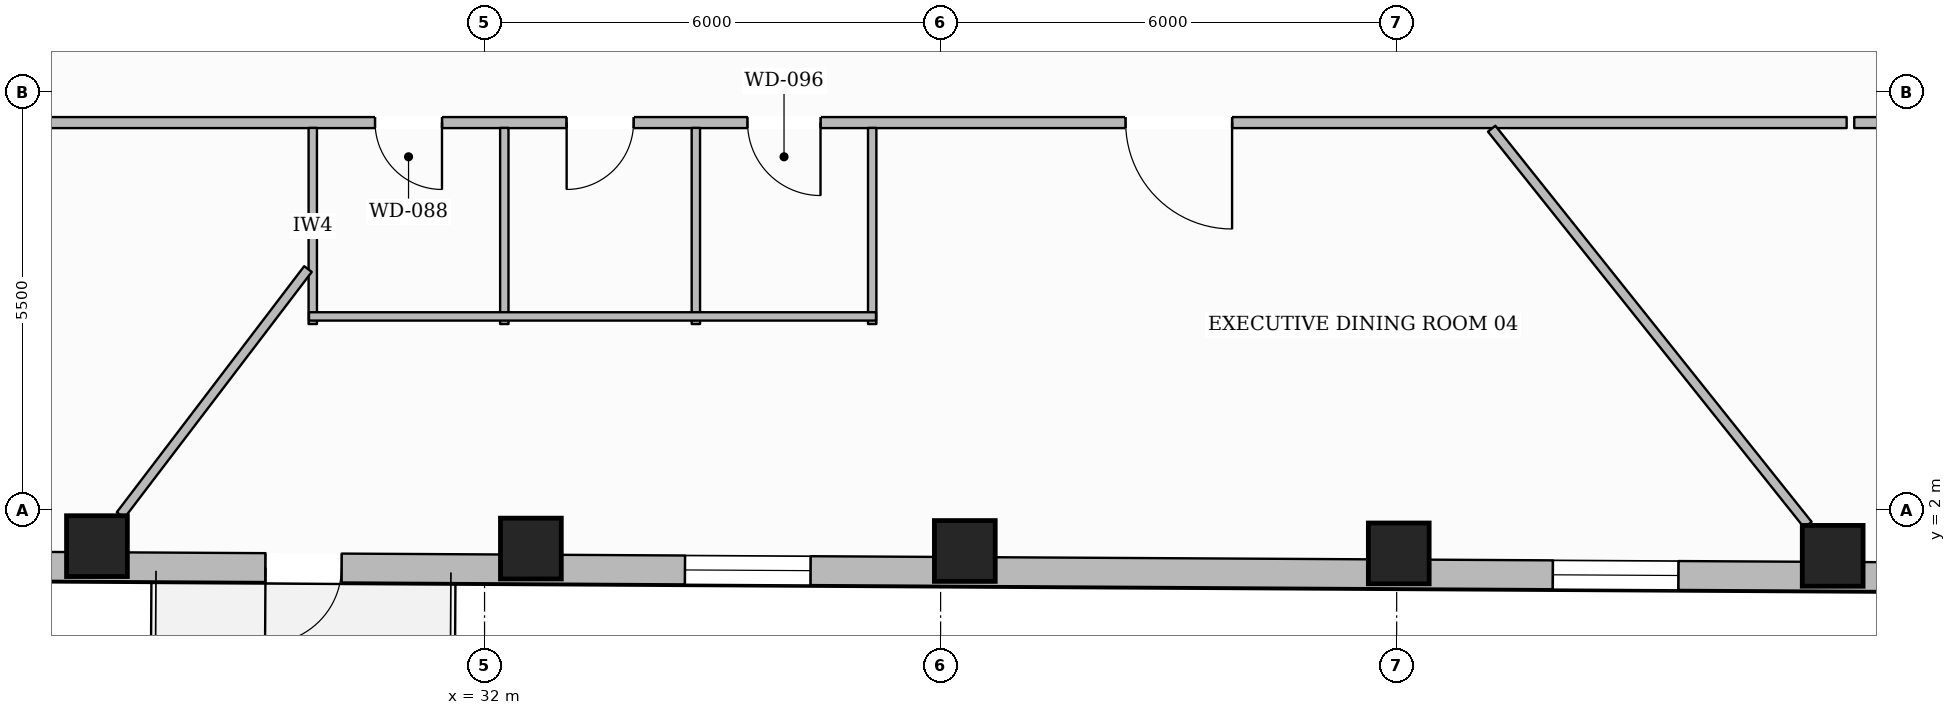
"""IFC4 building model, lengths in metres.
Left out: names, types, materials, properties, quantities, classifications, styles, units other than length and angle.
Written with IfcOpenShell. Run it as: python <this file> out.ifc"""

import sys

from ifc_helpers import new_model, si_unit, direction, frame, frame_2d, origin, origin_2d, place, context, subcontext, project, spatial, rectangle, hollow_rectangle, extrude, element, fill, save


model = new_model("IFC4")
c1 = context("Model", 3, precision=1e-05, world=origin(), true_north=direction((0.0, 1.0)))
c2 = subcontext(c1, "Body", "Model", "MODEL_VIEW")
j1 = project(units=[si_unit("LENGTHUNIT", "METRE"), si_unit("PLANEANGLEUNIT", "RADIAN")], contexts=[c1])
p1 = place(None, origin())
s1 = spatial("IfcSite", under=j1, at=p1, CompositionType="ELEMENT")
p2 = place(p1, origin())
s2 = spatial("IfcBuilding", under=s1, at=p2, CompositionType="ELEMENT")
p3 = place(p2, frame((0.0, 0.0, 48.35)))
s3 = spatial("IfcBuildingStorey", under=s2, at=p3, CompositionType="ELEMENT", Elevation=48.35)
for number, where, z_axis, x_axis in (
    (1, (26.901, 1.528, 0.0), (0.0, 0.0, 1.0), (1.0, 0.0, 0.0)),
    (2, (32.61, 1.496, 0.0), (0.0, 0.0, 1.0), (1.0, 0.0, 0.0)),
    (3, (38.319, 1.464, 0.0), (0.0, 0.0, 1.0), (1.0, 0.0, 0.0)),
    (4, (44.027, 1.432, 0.0), (0.0, 0.0, 1.0), (1.0, 0.0, 0.0)),
    (5, (49.736, 1.4, 0.0), (0.0, 0.0, 1.0), (1.0, 0.0, 0.0)),
):
    element("IfcColumn", number, at=place(p3, frame(where, z_axis=z_axis, x_axis=x_axis)), inside=s3, PredefinedType="COLUMN", context=c2, shape_type="SweptSolid", body=[
        extrude(hollow_rectangle(XDim=0.8, YDim=0.8, WallThickness=0.036, at=origin_2d()), origin(), (0.0, 0.0, 1.0), 3.59),
    ])
p4 = place(p3, frame((55.923, 1.096, 0.0), z_axis=(0.0, 0.0, 1.0), x_axis=(-0.999984419156, 0.005582243732, 0.0)))
e6 = element("IfcWall", 6, at=p4, inside=s3, PredefinedType="STANDARD", context=c2, shape_type="SweptSolid", body=[
    extrude(rectangle(XDim=35.207, YDim=0.38, at=frame_2d((17.604, 0.0))), origin(), (0.0, 0.0, 1.0), 2.97),
])
p5 = place(p4, frame((25.805, 0.0, 0.0)))
e7 = element("IfcOpeningElement", 7, at=p5, cuts=e6, PredefinedType="OPENING", context=c2, shape_type="SweptSolid", body=[
    extrude(rectangle(XDim=1.0, YDim=2.2, at=frame_2d((0.5, 1.1))), frame((0.0, 0.2, 0.0), z_axis=(0.0, -1.0, 0.0), x_axis=(1.0, 0.0, 0.0)), (0.0, 0.0, 1.0), 0.4),
])
p6 = place(p4, frame((31.054, 0.0, 0.65)))
e8 = element("IfcOpeningElement", 8, at=p6, cuts=e6, PredefinedType="OPENING", context=c2, shape_type="SweptSolid", body=[
    extrude(rectangle(XDim=1.65, YDim=1.75, at=frame_2d((0.825, 0.875))), frame((0.0, 0.2, 0.0), z_axis=(0.0, -1.0, 0.0), x_axis=(1.0, 0.0, 0.0)), (0.0, 0.0, 1.0), 0.4),
])
p7 = place(p4, frame((19.636, 0.0, 0.65)))
e9 = element("IfcOpeningElement", 9, at=p7, cuts=e6, PredefinedType="OPENING", context=c2, shape_type="SweptSolid", body=[
    extrude(rectangle(XDim=1.65, YDim=1.75, at=frame_2d((0.825, 0.875))), frame((0.0, 0.2, 0.0), z_axis=(0.0, -1.0, 0.0), x_axis=(1.0, 0.0, 0.0)), (0.0, 0.0, 1.0), 0.4),
])
p8 = place(p4, frame((8.218, 0.0, 0.65)))
e10 = element("IfcOpeningElement", 10, at=p8, cuts=e6, PredefinedType="OPENING", context=c2, shape_type="SweptSolid", body=[
    extrude(rectangle(XDim=1.65, YDim=1.75, at=frame_2d((0.825, 0.875))), frame((0.0, 0.2, 0.0), z_axis=(0.0, -1.0, 0.0), x_axis=(1.0, 0.0, 0.0)), (0.0, 0.0, 1.0), 0.4),
])
p9 = place(p4, frame((2.509, 0.0, 0.65)))
e11 = element("IfcOpeningElement", 11, at=p9, cuts=e6, PredefinedType="OPENING", context=c2, shape_type="SweptSolid", body=[
    extrude(rectangle(XDim=1.65, YDim=1.75, at=frame_2d((0.825, 0.875))), frame((0.0, 0.2, 0.0), z_axis=(0.0, -1.0, 0.0), x_axis=(1.0, 0.0, 0.0)), (0.0, 0.0, 1.0), 0.4),
])
p10 = place(p3, frame((56.681, 7.1, 0.0), z_axis=(0.0, 0.0, 1.0), x_axis=(-1.0, 0.0, 0.0)))
e12 = element("IfcWall", 12, at=p10, inside=s3, PredefinedType="PARTITIONING", context=c2, shape_type="SweptSolid", body=[
    extrude(rectangle(XDim=6.661, YDim=0.145, at=frame_2d((3.331, 0.0))), origin(), (0.0, 0.0, 1.0), 3.59),
])
p11 = place(p3, frame((49.92, 7.1, 0.0), z_axis=(0.0, 0.0, 1.0), x_axis=(-1.0, 0.0, 0.0)))
e13 = element("IfcWall", 13, at=p11, inside=s3, PredefinedType="PARTITIONING", context=c2, shape_type="SweptSolid", body=[
    extrude(rectangle(XDim=23.84, YDim=0.145, at=frame_2d((11.92, 0.0))), origin(), (0.0, 0.0, 1.0), 3.278),
])
p12 = place(p11, frame((18.48, 0.0, 0.0)))
e14 = element("IfcOpeningElement", 14, at=p12, cuts=e13, PredefinedType="OPENING", context=c2, shape_type="SweptSolid", body=[
    extrude(rectangle(XDim=0.88, YDim=2.1, at=frame_2d((0.44, 1.05))), frame((0.0, 0.083, 0.0), z_axis=(0.0, -1.0, 0.0), x_axis=(1.0, 0.0, 0.0)), (0.0, 0.0, 1.0), 0.165),
])
p13 = place(p11, frame((15.96, 0.0, 0.0)))
e15 = element("IfcOpeningElement", 15, at=p13, cuts=e13, PredefinedType="OPENING", context=c2, shape_type="SweptSolid", body=[
    extrude(rectangle(XDim=0.88, YDim=2.1, at=frame_2d((0.44, 1.05))), frame((0.0, 0.083, 0.0), z_axis=(0.0, -1.0, 0.0), x_axis=(1.0, 0.0, 0.0)), (0.0, 0.0, 1.0), 0.165),
])
p14 = place(p11, frame((13.5, 0.0, 0.0)))
e16 = element("IfcOpeningElement", 16, at=p14, cuts=e13, PredefinedType="OPENING", context=c2, shape_type="SweptSolid", body=[
    extrude(rectangle(XDim=0.96, YDim=2.1, at=frame_2d((0.48, 1.05))), frame((0.0, 0.083, 0.0), z_axis=(0.0, -1.0, 0.0), x_axis=(1.0, 0.0, 0.0)), (0.0, 0.0, 1.0), 0.165),
])
p15 = place(p11, frame((8.085, 0.0, 0.0)))
e17 = element("IfcOpeningElement", 17, at=p15, cuts=e13, PredefinedType="OPENING", context=c2, shape_type="SweptSolid", body=[
    extrude(rectangle(XDim=1.4, YDim=2.2, at=frame_2d((0.7, 1.1))), frame((0.0, 0.083, 0.0), z_axis=(0.0, -1.0, 0.0), x_axis=(1.0, 0.0, 0.0)), (0.0, 0.0, 1.0), 0.165),
])
for number, where, z_axis, x_axis in (
    (18, (29.74, 4.45, 0.0), (0.0, 0.0, 1.0), (0.0, 1.0, 0.0)),
    (19, (32.26, 4.45, 0.0), (0.0, 0.0, 1.0), (0.0, 1.0, 0.0)),
    (20, (34.78, 4.45, 0.0), (0.0, 0.0, 1.0), (0.0, 1.0, 0.0)),
    (21, (37.1, 4.45, 0.0), (0.0, 0.0, 1.0), (0.0, 1.0, 0.0)),
):
    element("IfcWall", number, at=place(p3, frame(where, z_axis=z_axis, x_axis=x_axis)), inside=s3, PredefinedType="PLUMBINGWALL", context=c2, shape_type="SweptSolid", body=[
        extrude(rectangle(XDim=2.58, YDim=0.11, at=frame_2d((1.29, 0.0))), origin(), (0.0, 0.0, 1.0), 3.59),
    ])
p16 = place(p3, frame((29.69, 4.55, 0.0), z_axis=(0.0, 0.0, 1.0), x_axis=(1.0, 0.0, 0.0)))
e22 = element("IfcWall", 22, at=p16, inside=s3, PredefinedType="PLUMBINGWALL", context=c2, shape_type="SweptSolid", body=[
    extrude(rectangle(XDim=7.46, YDim=0.11, at=frame_2d((3.73, 0.0))), origin(), (0.0, 0.0, 1.0), 3.59),
])
p17 = place(p3, frame((29.677, 5.173, 0.0), z_axis=(0.0, 0.0, 1.0), x_axis=(-0.605925707835, -0.795521235785, 0.0)))
e23 = element("IfcWall", 23, at=p17, inside=s3, PredefinedType="PARTITIONING", context=c2, shape_type="SweptSolid", body=[
    extrude(rectangle(XDim=4.069, YDim=0.125, at=frame_2d((2.035, 0.0))), origin(), (0.0, 0.0, 1.0), 3.59),
])
p18 = place(p3, frame((45.25, 7.02, 0.0), z_axis=(0.0, 0.0, 1.0), x_axis=(0.623935730438, -0.781475658151, 0.0)))
e24 = element("IfcWall", 24, at=p18, inside=s3, PredefinedType="PARTITIONING", context=c2, shape_type="SweptSolid", body=[
    extrude(rectangle(XDim=6.668, YDim=0.125, at=frame_2d((3.334, 0.0))), origin(), (0.0, 0.0, 1.0), 3.59),
])
p19 = place(p5, origin())
e25 = element("IfcDoor", 25, at=p19, inside=s3, OperationType="SINGLE_SWING_RIGHT", PredefinedType="DOOR", context=c2, shape_type="SweptSolid", body=[
    extrude(rectangle(XDim=1.0, YDim=2.2, at=frame_2d((0.5, 1.1))), frame((0.0, 0.025, 0.0), z_axis=(0.0, -1.0, 0.0), x_axis=(1.0, 0.0, 0.0)), (0.0, 0.0, 1.0), 0.05),
])
fill(e7, e25)
p20 = place(p7, origin())
e26 = element("IfcWindow", 26, at=p20, inside=s3, PartitioningType="SINGLE_PANEL", PredefinedType="WINDOW", context=c2, shape_type="SweptSolid", body=[
    extrude(rectangle(XDim=1.65, YDim=1.75, at=frame_2d((0.825, 0.875))), frame((0.0, 0.03, 0.0), z_axis=(0.0, -1.0, 0.0), x_axis=(1.0, 0.0, 0.0)), (0.0, 0.0, 1.0), 0.06),
])
fill(e9, e26)
p21 = place(p8, origin())
e27 = element("IfcWindow", 27, at=p21, inside=s3, PartitioningType="SINGLE_PANEL", PredefinedType="WINDOW", context=c2, shape_type="SweptSolid", body=[
    extrude(rectangle(XDim=1.65, YDim=1.75, at=frame_2d((0.825, 0.875))), frame((0.0, 0.03, 0.0), z_axis=(0.0, -1.0, 0.0), x_axis=(1.0, 0.0, 0.0)), (0.0, 0.0, 1.0), 0.06),
])
fill(e10, e27)
p22 = place(p12, origin())
e28 = element("IfcDoor", 28, at=p22, inside=s3, OperationType="SINGLE_SWING_LEFT", PredefinedType="DOOR", context=c2, shape_type="SweptSolid", body=[
    extrude(rectangle(XDim=0.88, YDim=2.1, at=frame_2d((0.44, 1.05))), frame((0.0, 0.025, 0.0), z_axis=(0.0, -1.0, 0.0), x_axis=(1.0, 0.0, 0.0)), (0.0, 0.0, 1.0), 0.05),
])
fill(e14, e28)
p23 = place(p13, origin())
e29 = element("IfcDoor", 29, at=p23, inside=s3, OperationType="SINGLE_SWING_RIGHT", PredefinedType="DOOR", context=c2, shape_type="SweptSolid", body=[
    extrude(rectangle(XDim=0.88, YDim=2.1, at=frame_2d((0.44, 1.05))), frame((0.0, 0.025, 0.0), z_axis=(0.0, -1.0, 0.0), x_axis=(1.0, 0.0, 0.0)), (0.0, 0.0, 1.0), 0.05),
])
fill(e15, e29)
p24 = place(p14, origin())
e30 = element("IfcDoor", 30, at=p24, inside=s3, OperationType="SINGLE_SWING_LEFT", PredefinedType="DOOR", context=c2, shape_type="SweptSolid", body=[
    extrude(rectangle(XDim=0.96, YDim=2.1, at=frame_2d((0.48, 1.05))), frame((0.0, 0.025, 0.0), z_axis=(0.0, -1.0, 0.0), x_axis=(1.0, 0.0, 0.0)), (0.0, 0.0, 1.0), 0.05),
])
fill(e16, e30)
p25 = place(p15, origin())
e31 = element("IfcDoor", 31, at=p25, inside=s3, OperationType="SINGLE_SWING_LEFT", PredefinedType="DOOR", context=c2, shape_type="SweptSolid", body=[
    extrude(rectangle(XDim=1.4, YDim=2.2, at=frame_2d((0.7, 1.1))), frame((0.0, 0.025, 0.0), z_axis=(0.0, -1.0, 0.0), x_axis=(1.0, 0.0, 0.0)), (0.0, 0.0, 1.0), 0.05),
])
fill(e17, e31)
save(model, sys.argv[1])
